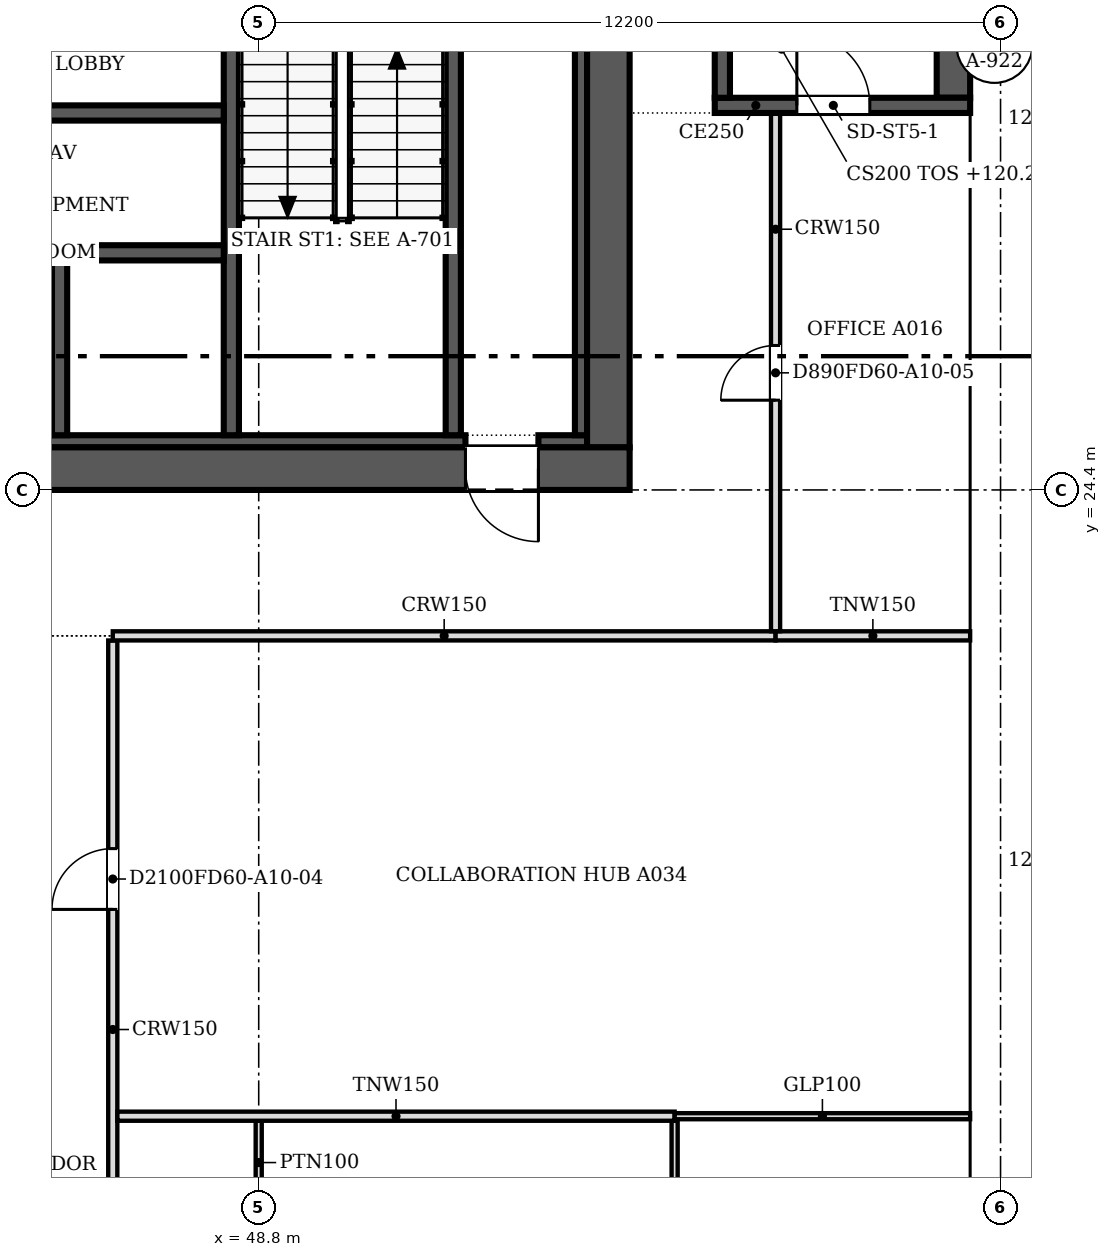
"""IFC4 building model, lengths in metres.
Left out: names, types, materials, properties, quantities, classifications, styles, units other than length and angle.
Written with IfcOpenShell. Run it as: python <this file> out.ifc"""

import sys

from ifc_helpers import new_model, si_unit, direction, frame, frame_2d, origin, place, context, subcontext, project, spatial, polyline, rectangle, outline, extrude, faceted_brep, source, transform, mapped, element, fill, save


model = new_model("IFC4")
c1 = context("Model", 3, precision=1e-05, world=origin(), true_north=direction((0.0, 1.0)))
c2 = subcontext(c1, "Body", "Model", "MODEL_VIEW")
j1 = project(units=[si_unit("LENGTHUNIT", "METRE"), si_unit("PLANEANGLEUNIT", "RADIAN")], contexts=[c1])
p1 = place(None, origin())
s1 = spatial("IfcSite", under=j1, at=p1, CompositionType="ELEMENT")
p2 = place(p1, origin())
s2 = spatial("IfcBuilding", under=s1, at=p2, CompositionType="ELEMENT")
p3 = place(p2, frame((0.0, 0.0, 120.2)))
s3 = spatial("IfcBuildingStorey", under=s2, at=p3, CompositionType="ELEMENT", Elevation=120.2)
m1 = source(origin(), c2, "Body", "SweptSolid", [
    extrude(outline(polyline([(3.05, 0.0), (6.1, 3.8), (3.05, 7.6), (0.0, 3.8), (3.05, 0.0)])), frame((0.0, 0.25, 0.0), z_axis=(0.0, -1.0, 0.0), x_axis=(1.0, 0.0, 0.0)), (0.0, 0.0, 1.0), 0.5),
])
p4 = place(p3, frame((60.75, 12.2, -3.8), z_axis=(0.0, 0.0, 1.0), x_axis=(0.0, 1.0, 0.0)))
e1 = element("IfcWall", 1, at=p4, inside=s3, PredefinedType="SOLIDWALL", context=c2, shape_type="MappedRepresentation", body=[
    mapped(m1, transform((0.0, 0.0, 0.0), scale=1.0)),
])
m2 = source(origin(), c2, "Body", "SweptSolid", [
    extrude(outline(polyline([(3.05, 0.399), (5.78, 3.8), (3.05, 7.201), (0.321, 3.8), (3.05, 0.399)])), frame((0.0, 0.26, 0.0), z_axis=(0.0, -1.0, 0.0), x_axis=(1.0, 0.0, 0.0)), (0.0, 0.0, 1.0), 0.52),
])
p5 = place(p4, origin())
e2 = element("IfcOpeningElement", 2, at=p5, cuts=e1, PredefinedType="OPENING", context=c2, shape_type="MappedRepresentation", body=[
    mapped(m2, transform((0.0, 0.0, 0.0), scale=1.0)),
])
m3 = source(origin(), c2, "Body", "Brep", [
    faceted_brep([(3.05, -0.25, 0.0), (6.1, -0.25, 3.8), (6.1, -0.25, 3.8), (3.05, -0.25, 7.6), (0.0, -0.25, 3.8), (0.0, 0.25, 3.8), (3.05, 0.25, 7.6), (6.1, 0.25, 3.8), (6.1, 0.25, 3.8), (3.05, 0.25, 0.0)], [[[0, 1, 2, 3, 4]], [[5, 6, 7, 8, 9]], [[9, 8, 1, 0]], [[7, 6, 3, 2]], [[6, 5, 4, 3]], [[5, 9, 0, 4]], [[1, 8, 7, 2]]]),
])
p6 = place(p3, frame((60.75, 18.3, -3.8), z_axis=(0.0, 0.0, 1.0), x_axis=(0.0, 1.0, 0.0)))
e3 = element("IfcWall", 3, at=p6, inside=s3, PredefinedType="SOLIDWALL", context=c2, shape_type="MappedRepresentation", body=[
    mapped(m3, transform((0.0, 0.0, 0.0), scale=1.0)),
])
p7 = place(p6, origin())
e4 = element("IfcOpeningElement", 4, at=p7, cuts=e3, PredefinedType="OPENING", context=c2, shape_type="MappedRepresentation", body=[
    mapped(m2, transform((0.0, 0.0, 0.0), scale=1.0)),
])
p8 = place(p3, frame((60.75, 24.4, -3.8), z_axis=(0.0, 0.0, 1.0), x_axis=(0.0, 1.0, 0.0)))
e5 = element("IfcWall", 5, at=p8, inside=s3, PredefinedType="SOLIDWALL", context=c2, shape_type="MappedRepresentation", body=[
    mapped(m1, transform((0.0, 0.0, 0.0), scale=1.0)),
])
p9 = place(p8, origin())
e6 = element("IfcOpeningElement", 6, at=p9, cuts=e5, PredefinedType="OPENING", context=c2, shape_type="MappedRepresentation", body=[
    mapped(m2, transform((0.0, 0.0, 0.0), scale=1.0)),
])
p10 = place(p3, frame((60.75, 30.5, -3.8), z_axis=(0.0, 0.0, 1.0), x_axis=(0.0, 1.0, 0.0)))
e7 = element("IfcWall", 7, at=p10, inside=s3, PredefinedType="SOLIDWALL", context=c2, shape_type="MappedRepresentation", body=[
    mapped(m1, transform((0.0, 0.0, 0.0), scale=1.0)),
])
p11 = place(p10, origin())
e8 = element("IfcOpeningElement", 8, at=p11, cuts=e7, PredefinedType="OPENING", context=c2, shape_type="MappedRepresentation", body=[
    mapped(m2, transform((0.0, 0.0, 0.0), scale=1.0)),
])
p12 = place(p2, frame((0.0, 0.0, 124.0)))
s4 = spatial("IfcBuildingStorey", under=s2, at=p12, CompositionType="ELEMENT", Elevation=124.0)
p13 = place(p12, frame((60.75, 9.15, -3.8), z_axis=(0.0, 0.0, 1.0), x_axis=(0.0, 1.0, 0.0)))
e9 = element("IfcWall", 9, at=p13, inside=s4, PredefinedType="SOLIDWALL", context=c2, shape_type="MappedRepresentation", body=[
    mapped(m1, transform((0.0, 0.0, 0.0), scale=1.0)),
])
p14 = place(p13, origin())
e10 = element("IfcOpeningElement", 10, at=p14, cuts=e9, PredefinedType="OPENING", context=c2, shape_type="MappedRepresentation", body=[
    mapped(m2, transform((0.0, 0.0, 0.0), scale=1.0)),
])
p15 = place(p12, frame((60.75, 15.25, -3.8), z_axis=(0.0, 0.0, 1.0), x_axis=(0.0, 1.0, 0.0)))
e11 = element("IfcWall", 11, at=p15, inside=s4, PredefinedType="SOLIDWALL", context=c2, shape_type="MappedRepresentation", body=[
    mapped(m1, transform((0.0, 0.0, 0.0), scale=1.0)),
])
p16 = place(p15, origin())
e12 = element("IfcOpeningElement", 12, at=p16, cuts=e11, PredefinedType="OPENING", context=c2, shape_type="MappedRepresentation", body=[
    mapped(m2, transform((0.0, 0.0, 0.0), scale=1.0)),
])
p17 = place(p12, frame((60.75, 21.35, -3.8), z_axis=(0.0, 0.0, 1.0), x_axis=(0.0, 1.0, 0.0)))
e13 = element("IfcWall", 13, at=p17, inside=s4, PredefinedType="SOLIDWALL", context=c2, shape_type="MappedRepresentation", body=[
    mapped(m3, transform((0.0, 0.0, 0.0), scale=1.0)),
])
p18 = place(p17, origin())
e14 = element("IfcOpeningElement", 14, at=p18, cuts=e13, PredefinedType="OPENING", context=c2, shape_type="MappedRepresentation", body=[
    mapped(m2, transform((0.0, 0.0, 0.0), scale=1.0)),
])
p19 = place(p12, frame((60.75, 27.45, -3.8), z_axis=(0.0, 0.0, 1.0), x_axis=(0.0, 1.0, 0.0)))
e15 = element("IfcWall", 15, at=p19, inside=s4, PredefinedType="SOLIDWALL", context=c2, shape_type="MappedRepresentation", body=[
    mapped(m1, transform((0.0, 0.0, 0.0), scale=1.0)),
])
p20 = place(p19, origin())
e16 = element("IfcOpeningElement", 16, at=p20, cuts=e15, PredefinedType="OPENING", context=c2, shape_type="MappedRepresentation", body=[
    mapped(m2, transform((0.0, 0.0, 0.0), scale=1.0)),
])
p21 = place(p3, frame((54.9, 24.75, 0.0), z_axis=(0.0, 0.0, 1.0), x_axis=(-1.0, 0.0, 0.0)))
e17 = element("IfcWall", 17, at=p21, inside=s3, PredefinedType="SHEAR", context=c2, shape_type="SweptSolid", body=[
    extrude(rectangle(XDim=24.4, YDim=0.7, at=frame_2d((12.2, 0.0))), origin(), (0.0, 0.0, 1.0), 3.8),
])
m4 = source(origin(), c2, "Body", "SweptSolid", [
    extrude(rectangle(XDim=1.2, YDim=2.1, at=frame_2d((0.6, 1.05))), frame((0.0, 0.36, 0.0), z_axis=(0.0, -1.0, 0.0), x_axis=(1.0, 0.0, 0.0)), (0.0, 0.0, 1.0), 0.72),
])
p22 = place(p21, frame((1.5, 0.0, 0.0)))
e18 = element("IfcOpeningElement", 18, at=p22, cuts=e17, PredefinedType="OPENING", context=c2, shape_type="MappedRepresentation", body=[
    mapped(m4, transform((0.0, 0.0, 0.0), scale=1.0)),
])
p23 = place(p3, frame((54.55, 48.1, 0.0), z_axis=(0.0, 0.0, 1.0), x_axis=(0.0, -1.0, 0.0)))
e19 = element("IfcWall", 19, at=p23, inside=s3, PredefinedType="SHEAR", context=c2, shape_type="SweptSolid", body=[
    extrude(rectangle(XDim=23.0, YDim=0.7, at=frame_2d((11.5, 0.0))), origin(), (0.0, 0.0, 1.0), 3.8),
])
p24 = place(p23, frame((4.8, 0.0, 0.0)))
e20 = element("IfcOpeningElement", 20, at=p24, cuts=e19, PredefinedType="OPENING", context=c2, shape_type="MappedRepresentation", body=[
    mapped(m4, transform((0.0, 0.0, 0.0), scale=1.0)),
])
p25 = place(p3, frame((31.2, 25.2, 0.0), z_axis=(0.0, 0.0, 1.0), x_axis=(1.0, 0.0, 0.0)))
e21 = element("IfcWall", 21, at=p25, inside=s3, PredefinedType="SOLIDWALL", context=c2, shape_type="SweptSolid", body=[
    extrude(rectangle(XDim=21.0, YDim=0.2, at=frame_2d((10.5, 0.0))), origin(), (0.0, 0.0, 1.0), 3.8),
])
p26 = place(p3, frame((53.4, 25.2, 0.0), z_axis=(0.0, 0.0, 1.0), x_axis=(1.0, 0.0, 0.0)))
e22 = element("IfcWall", 22, at=p26, inside=s3, PredefinedType="SOLIDWALL", context=c2, shape_type="SweptSolid", body=[
    extrude(rectangle(XDim=0.8, YDim=0.2, at=frame_2d((0.4, 0.0))), origin(), (0.0, 0.0, 1.0), 3.8),
])
p27 = place(p3, frame((54.1, 25.3, 0.0), z_axis=(0.0, 0.0, 1.0), x_axis=(0.0, 1.0, 0.0)))
e23 = element("IfcWall", 23, at=p27, inside=s3, PredefinedType="SOLIDWALL", context=c2, shape_type="SweptSolid", body=[
    extrude(rectangle(XDim=11.02, YDim=0.2, at=frame_2d((5.51, 0.0))), origin(), (0.0, 0.0, 1.0), 3.8),
])
p28 = place(p3, frame((48.35, 36.35, 0.0), z_axis=(0.0, 0.0, 1.0), x_axis=(0.0, -1.0, 0.0)))
e24 = element("IfcWall", 24, at=p28, inside=s3, PredefinedType="SOLIDWALL", context=c2, shape_type="SweptSolid", body=[
    extrude(rectangle(XDim=11.05, YDim=0.25, at=frame_2d((5.525, 0.0))), origin(), (0.0, 0.0, 1.0), 3.8),
])
m5 = source(origin(), c2, "Body", "SweptSolid", [
    extrude(rectangle(XDim=1.2, YDim=2.1, at=frame_2d((0.6, 1.05))), frame((0.0, 0.135, 0.0), z_axis=(0.0, -1.0, 0.0), x_axis=(1.0, 0.0, 0.0)), (0.0, 0.0, 1.0), 0.27),
])
p29 = place(p28, frame((3.225, 0.0, 0.0)))
e25 = element("IfcOpeningElement", 25, at=p29, cuts=e24, PredefinedType="OPENING", context=c2, shape_type="MappedRepresentation", body=[
    mapped(m5, transform((0.0, 0.0, 0.0), scale=1.0)),
])
p30 = place(p3, frame((52.0, 25.3, 0.0), z_axis=(0.0, 0.0, 1.0), x_axis=(0.0, 1.0, 0.0)))
e26 = element("IfcWall", 26, at=p30, inside=s3, PredefinedType="SOLIDWALL", context=c2, shape_type="SweptSolid", body=[
    extrude(rectangle(XDim=7.975, YDim=0.25, at=frame_2d((3.987, 0.0))), origin(), (0.0, 0.0, 1.0), 3.8),
])
p31 = place(p30, frame((6.625, 0.0, 0.0)))
e27 = element("IfcOpeningElement", 27, at=p31, cuts=e26, PredefinedType="OPENING", context=c2, shape_type="MappedRepresentation", body=[
    mapped(m5, transform((0.0, 0.0, 0.0), scale=1.0)),
])
for number, where, z_axis, x_axis in (
    (28, (42.95, 28.3, 0.0), (0.0, 0.0, 1.0), (1.0, 0.0, 0.0)),
    (29, (42.95, 30.6, 0.0), (0.0, 0.0, 1.0), (1.0, 0.0, 0.0)),
):
    element("IfcWall", number, at=place(p3, frame(where, z_axis=z_axis, x_axis=x_axis)), inside=s3, PredefinedType="SOLIDWALL", context=c2, shape_type="SweptSolid", body=[
        extrude(rectangle(XDim=5.275, YDim=0.25, at=frame_2d((2.638, 0.0))), origin(), (0.0, 0.0, 1.0), 3.8),
    ])
p32 = place(p3, frame((45.525, 25.3, 0.0), z_axis=(0.0, 0.0, 1.0), x_axis=(0.0, 1.0, 0.0)))
e30 = element("IfcWall", 30, at=p32, inside=s3, PredefinedType="SOLIDWALL", context=c2, shape_type="SweptSolid", body=[
    extrude(rectangle(XDim=2.875, YDim=0.25, at=frame_2d((1.438, 0.0))), origin(), (0.0, 0.0, 1.0), 3.8),
])
p33 = place(p3, frame((60.5, 30.725, 0.0), z_axis=(0.0, 0.0, 1.0), x_axis=(-1.0, 0.0, 0.0)))
e31 = element("IfcWall", 31, at=p33, inside=s3, PredefinedType="SOLIDWALL", context=c2, shape_type="SweptSolid", body=[
    extrude(rectangle(XDim=4.2, YDim=0.25, at=frame_2d((2.1, 0.0))), origin(), (0.0, 0.0, 1.0), 3.8),
])
p34 = place(p33, frame((1.65, 0.0, 0.0)))
e32 = element("IfcOpeningElement", 32, at=p34, cuts=e31, PredefinedType="OPENING", context=c2, shape_type="MappedRepresentation", body=[
    mapped(m5, transform((0.0, 0.0, 0.0), scale=1.0)),
])
p35 = place(p3, frame((56.425, 30.85, 0.0), z_axis=(0.0, 0.0, 1.0), x_axis=(0.0, 1.0, 0.0)))
e33 = element("IfcWall", 33, at=p35, inside=s3, PredefinedType="SOLIDWALL", context=c2, shape_type="SweptSolid", body=[
    extrude(rectangle(XDim=8.0, YDim=0.25, at=frame_2d((4.0, 0.0))), origin(), (0.0, 0.0, 1.0), 3.8),
])
p36 = place(p3, frame((60.225, 38.85, 0.0), z_axis=(0.0, 0.0, 1.0), x_axis=(0.0, -1.0, 0.0)))
e34 = element("IfcWall", 34, at=p36, inside=s3, PredefinedType="SOLIDWALL", context=c2, shape_type="SweptSolid", body=[
    extrude(rectangle(XDim=8.0, YDim=0.55, at=frame_2d((4.0, 0.0))), origin(), (0.0, 0.0, 1.0), 3.8),
])
p37 = place(p3, frame((46.4, 21.924, 0.0), z_axis=(0.0, 0.0, 1.0), x_axis=(0.0, -1.0, 0.0)))
e35 = element("IfcWall", 35, at=p37, inside=s3, PredefinedType="PARTITIONING", context=c2, shape_type="SweptSolid", body=[
    extrude(rectangle(XDim=17.724, YDim=0.15, at=frame_2d((8.862, 0.0))), origin(), (0.0, 0.0, 1.0), 3.067),
])
m6 = source(origin(), c2, "Body", "SweptSolid", [
    extrude(rectangle(XDim=1.0, YDim=2.1, at=frame_2d((0.5, 1.05))), frame((0.0, 0.085, 0.0), z_axis=(0.0, -1.0, 0.0), x_axis=(1.0, 0.0, 0.0)), (0.0, 0.0, 1.0), 0.17),
])
p38 = place(p37, frame((3.423, 0.0, 0.0)))
e36 = element("IfcOpeningElement", 36, at=p38, cuts=e35, PredefinedType="OPENING", context=c2, shape_type="MappedRepresentation", body=[
    mapped(m6, transform((0.0, 0.0, 0.0), scale=1.0)),
])
m7 = source(origin(), c2, "Body", "SweptSolid", [
    extrude(rectangle(XDim=0.9, YDim=2.1, at=frame_2d((0.45, 1.05))), frame((0.0, 0.085, 0.0), z_axis=(0.0, -1.0, 0.0), x_axis=(1.0, 0.0, 0.0)), (0.0, 0.0, 1.0), 0.17),
])
p39 = place(p37, frame((12.324, 0.0, 0.0)))
e37 = element("IfcOpeningElement", 37, at=p39, cuts=e35, PredefinedType="OPENING", context=c2, shape_type="MappedRepresentation", body=[
    mapped(m7, transform((0.0, 0.0, 0.0), scale=1.0)),
])
p40 = place(p3, frame((55.64, 14.024, 0.0), z_axis=(0.0, 0.0, 1.0), x_axis=(0.0, -1.0, 0.0)))
e38 = element("IfcWall", 38, at=p40, inside=s3, PredefinedType="PARTITIONING", context=c2, shape_type="SweptSolid", body=[
    extrude(rectangle(XDim=5.924, YDim=0.1, at=frame_2d((2.962, 0.0))), origin(), (0.0, 0.0, 1.0), 3.067),
])
m8 = source(origin(), c2, "Body", "SweptSolid", [
    extrude(rectangle(XDim=0.9, YDim=2.1, at=frame_2d((0.45, 1.05))), frame((0.0, 0.06, 0.0), z_axis=(0.0, -1.0, 0.0), x_axis=(1.0, 0.0, 0.0)), (0.0, 0.0, 1.0), 0.12),
])
p41 = place(p40, frame((2.524, 0.0, 0.0)))
e39 = element("IfcOpeningElement", 39, at=p41, cuts=e38, PredefinedType="OPENING", context=c2, shape_type="MappedRepresentation", body=[
    mapped(m8, transform((0.0, 0.0, 0.0), scale=1.0)),
])
p42 = place(p3, frame((48.8, 12.65, 0.0), z_axis=(0.0, 0.0, 1.0), x_axis=(0.0, 1.0, 0.0)))
e40 = element("IfcWall", 40, at=p42, inside=s3, PredefinedType="PARTITIONING", context=c2, shape_type="SweptSolid", body=[
    extrude(rectangle(XDim=1.375, YDim=0.1, at=frame_2d((0.688, 0.0))), origin(), (0.0, 0.0, 1.0), 3.067),
])
p43 = place(p3, frame((46.476, 14.1, 0.0), z_axis=(0.0, 0.0, 1.0), x_axis=(1.0, 0.0, 0.0)))
e41 = element("IfcWall", 41, at=p43, inside=s3, PredefinedType="PARTITIONING", context=c2, shape_type="SweptSolid", body=[
    extrude(rectangle(XDim=9.164, YDim=0.15, at=frame_2d((4.582, 0.0))), origin(), (0.0, 0.0, 1.0), 3.067),
])
p44 = place(p3, frame((55.641, 14.1, 0.0), z_axis=(0.0, 0.0, 1.0), x_axis=(1.0, 0.0, 0.0)))
e42 = element("IfcWall", 42, at=p44, inside=s3, PredefinedType="PARTITIONING", context=c2, shape_type="SweptSolid", body=[
    extrude(rectangle(XDim=4.859, YDim=0.1, at=frame_2d((2.429, 0.0))), origin(), (0.0, 0.0, 1.0), 3.067),
])
p45 = place(p3, frame((46.4, 22.0, 0.0), z_axis=(0.0, 0.0, 1.0), x_axis=(1.0, 0.0, 0.0)))
e43 = element("IfcWall", 43, at=p45, inside=s3, PredefinedType="PARTITIONING", context=c2, shape_type="SweptSolid", body=[
    extrude(rectangle(XDim=10.9, YDim=0.15, at=frame_2d((5.45, 0.0))), origin(), (0.0, 0.0, 1.0), 3.067),
])
p46 = place(p3, frame((57.301, 22.0, 0.0), z_axis=(0.0, 0.0, 1.0), x_axis=(1.0, 0.0, 0.0)))
e44 = element("IfcWall", 44, at=p46, inside=s3, PredefinedType="PARTITIONING", context=c2, shape_type="SweptSolid", body=[
    extrude(rectangle(XDim=3.199, YDim=0.15, at=frame_2d((1.6, 0.0))), origin(), (0.0, 0.0, 1.0), 3.067),
])
p47 = place(p3, frame((57.3, 30.6, 0.0), z_axis=(0.0, 0.0, 1.0), x_axis=(0.0, -1.0, 0.0)))
e45 = element("IfcWall", 45, at=p47, inside=s3, PredefinedType="PARTITIONING", context=c2, shape_type="SweptSolid", body=[
    extrude(rectangle(XDim=8.524, YDim=0.15, at=frame_2d((4.262, 0.0))), origin(), (0.0, 0.0, 1.0), 3.067),
])
p48 = place(p47, frame((3.824, 0.0, 0.0)))
e46 = element("IfcOpeningElement", 46, at=p48, cuts=e45, PredefinedType="OPENING", context=c2, shape_type="MappedRepresentation", body=[
    mapped(m7, transform((0.0, 0.0, 0.0), scale=1.0)),
])
m9 = source(origin(), c2, "Body", "SweptSolid", [
    extrude(rectangle(XDim=1.2, YDim=2.1, at=frame_2d((0.6, 1.05))), frame((0.0, 0.025, 0.0), z_axis=(0.0, -1.0, 0.0), x_axis=(1.0, 0.0, 0.0)), (0.0, 0.0, 1.0), 0.05),
])
p49 = place(p22, origin())
e47 = element("IfcDoor", 47, at=p49, inside=s3, OperationType="SINGLE_SWING_LEFT", PredefinedType="DOOR", context=c2, shape_type="MappedRepresentation", body=[
    mapped(m9, transform((0.0, 0.0, 0.0), scale=1.0)),
])
fill(e18, e47)
p50 = place(p34, origin())
e48 = element("IfcDoor", 48, at=p50, inside=s3, OperationType="SINGLE_SWING_RIGHT", PredefinedType="DOOR", context=c2, shape_type="MappedRepresentation", body=[
    mapped(m9, transform((0.0, 0.0, 0.0), scale=1.0)),
])
fill(e32, e48)
m10 = source(origin(), c2, "Body", "SweptSolid", [
    extrude(rectangle(XDim=1.0, YDim=2.1, at=frame_2d((0.5, 1.05))), frame((0.0, 0.025, 0.0), z_axis=(0.0, -1.0, 0.0), x_axis=(1.0, 0.0, 0.0)), (0.0, 0.0, 1.0), 0.05),
])
p51 = place(p38, origin())
e49 = element("IfcDoor", 49, at=p51, inside=s3, OperationType="SINGLE_SWING_RIGHT", PredefinedType="DOOR", context=c2, shape_type="MappedRepresentation", body=[
    mapped(m10, transform((0.0, 0.0, 0.0), scale=1.0)),
])
fill(e36, e49)
m11 = source(origin(), c2, "Body", "SweptSolid", [
    extrude(rectangle(XDim=0.9, YDim=2.1, at=frame_2d((0.45, 1.05))), frame((0.0, 0.025, 0.0), z_axis=(0.0, -1.0, 0.0), x_axis=(1.0, 0.0, 0.0)), (0.0, 0.0, 1.0), 0.05),
])
p52 = place(p48, origin())
e50 = element("IfcDoor", 50, at=p52, inside=s3, OperationType="SINGLE_SWING_RIGHT", PredefinedType="DOOR", context=c2, shape_type="MappedRepresentation", body=[
    mapped(m11, transform((0.0, 0.0, 0.0), scale=1.0)),
])
fill(e46, e50)
save(model, sys.argv[1])
